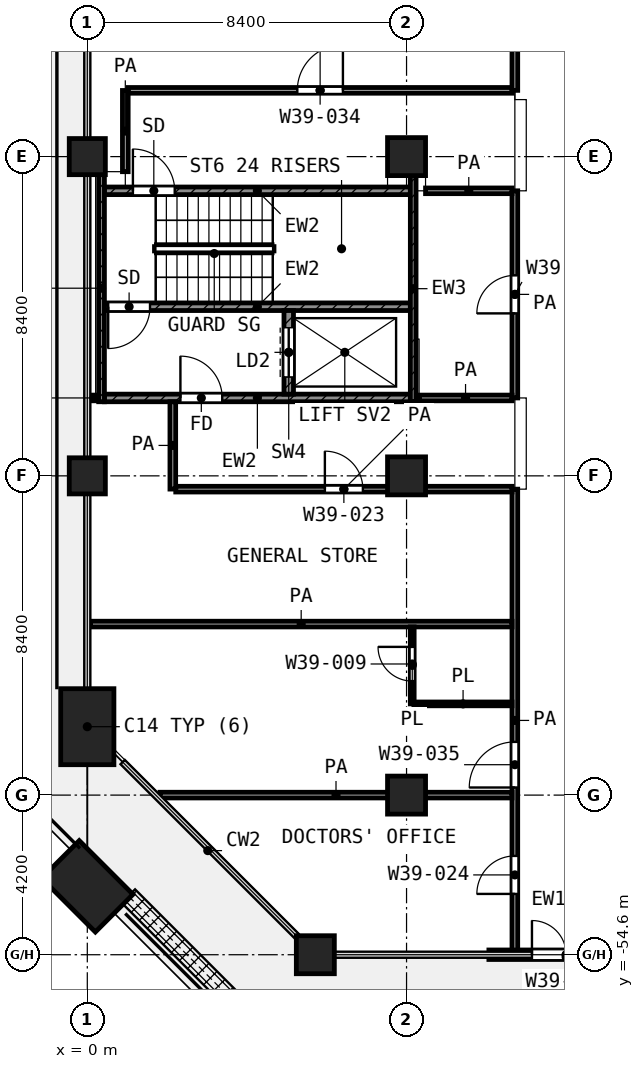
"""IFC4 building model, lengths in metres.
Left out: names, types, materials, properties, quantities, classifications, styles, units other than length and angle.
Written with IfcOpenShell. Run it as: python <this file> out.ifc"""

import sys

from ifc_helpers import new_model, si_unit, direction, frame, frame_2d, origin, origin_2d, place, context, subcontext, project, spatial, rectangle, extrude, element, fill, save


model = new_model("IFC4")
c1 = context("Model", 3, precision=1e-05, world=origin(), true_north=direction((0.0, 1.0)))
c2 = subcontext(c1, "Body", "Model", "MODEL_VIEW")
j1 = project(units=[si_unit("LENGTHUNIT", "METRE"), si_unit("PLANEANGLEUNIT", "RADIAN")], contexts=[c1])
p1 = place(None, origin())
s1 = spatial("IfcSite", under=j1, at=p1, CompositionType="ELEMENT")
p2 = place(p1, origin())
s2 = spatial("IfcBuilding", under=s1, at=p2, CompositionType="ELEMENT")
p3 = place(p2, frame((0.0, 0.0, 171.0)))
s3 = spatial("IfcBuildingStorey", under=s2, at=p3, CompositionType="ELEMENT", Elevation=171.0)
p4 = place(p3, frame((0.0, -33.6, 0.0), z_axis=(0.0, 0.0, 1.0), x_axis=(1.0, 0.0, 0.0)))
e1 = element("IfcColumn", 1, at=p4, inside=s3, PredefinedType="COLUMN", context=c2, shape_type="SweptSolid", body=[
    extrude(rectangle(XDim=0.95, YDim=0.95, at=origin_2d()), origin(), (0.0, 0.0, 1.0), 4.2),
])
p5 = place(p3, frame((8.4, -33.6, 0.0), z_axis=(0.0, 0.0, 1.0), x_axis=(1.0, 0.0, 0.0)))
e2 = element("IfcColumn", 2, at=p5, inside=s3, PredefinedType="COLUMN", context=c2, shape_type="SweptSolid", body=[
    extrude(rectangle(XDim=1.0, YDim=1.0, at=origin_2d()), origin(), (0.0, 0.0, 1.0), 4.2),
])
p6 = place(p3, frame((0.0, -42.0, 0.0), z_axis=(0.0, 0.0, 1.0), x_axis=(1.0, 0.0, 0.0)))
e3 = element("IfcColumn", 3, at=p6, inside=s3, PredefinedType="COLUMN", context=c2, shape_type="SweptSolid", body=[
    extrude(rectangle(XDim=0.95, YDim=0.95, at=origin_2d()), origin(), (0.0, 0.0, 1.0), 4.2),
])
p7 = place(p3, frame((8.4, -42.0, 0.0), z_axis=(0.0, 0.0, 1.0), x_axis=(1.0, 0.0, 0.0)))
e4 = element("IfcColumn", 4, at=p7, inside=s3, PredefinedType="COLUMN", context=c2, shape_type="SweptSolid", body=[
    extrude(rectangle(XDim=1.0, YDim=1.0, at=origin_2d()), origin(), (0.0, 0.0, 1.0), 4.2),
])
p8 = place(p3, frame((0.0, -48.6, 0.0), z_axis=(0.0, 0.0, 1.0), x_axis=(0.0, 1.0, 0.0)))
e5 = element("IfcColumn", 5, at=p8, inside=s3, PredefinedType="COLUMN", context=c2, shape_type="SweptSolid", body=[
    extrude(rectangle(XDim=2.0, YDim=1.4, at=origin_2d()), origin(), (0.0, 0.0, 1.0), 4.2),
])
for number, where, z_axis, x_axis in (
    (6, (8.4, -50.4, 0.0), (0.0, 0.0, 1.0), (1.0, 0.0, 0.0)),
    (7, (6.0, -54.6, 0.0), (0.0, 0.0, 1.0), (1.0, 0.0, 0.0)),
):
    element("IfcColumn", number, at=place(p3, frame(where, z_axis=z_axis, x_axis=x_axis)), inside=s3, PredefinedType="COLUMN", context=c2, shape_type="SweptSolid", body=[
        extrude(rectangle(XDim=1.0, YDim=1.0, at=origin_2d()), origin(), (0.0, 0.0, 1.0), 4.2),
    ])
p9 = place(p3, frame((0.0, -52.8, 0.0), z_axis=(0.0, 0.0, 1.0), x_axis=(-0.707106781187, 0.707106781187, 0.0)))
e8 = element("IfcColumn", 8, at=p9, inside=s3, PredefinedType="COLUMN", context=c2, shape_type="SweptSolid", body=[
    extrude(rectangle(XDim=2.0, YDim=1.4, at=origin_2d()), origin(), (0.0, 0.0, 1.0), 4.2),
])
p10 = place(p3, frame((10.567, -54.6, 0.0), z_axis=(0.0, 0.0, 1.0), x_axis=(1.0, 0.0, 0.0)))
e9 = element("IfcWall", 9, at=p10, inside=s3, PredefinedType="SOLIDWALL", context=c2, shape_type="SweptSolid", body=[
    extrude(rectangle(XDim=4.067, YDim=0.25, at=frame_2d((2.033, 0.0))), origin(), (0.0, 0.0, 1.0), 3.48),
])
p11 = place(p10, frame((1.133, 0.0, 0.0)))
e10 = element("IfcOpeningElement", 10, at=p11, cuts=e9, PredefinedType="OPENING", context=c2, shape_type="SweptSolid", body=[
    extrude(rectangle(XDim=1.8, YDim=2.1, at=frame_2d((0.9, 1.05))), frame((0.0, 0.135, 0.0), z_axis=(0.0, -1.0, 0.0), x_axis=(1.0, 0.0, 0.0)), (0.0, 0.0, 1.0), 0.27),
])
p12 = place(p3, frame((0.375, -40.05, 0.0), z_axis=(0.0, 0.0, 1.0), x_axis=(0.0, 1.0, 0.0)))
e11 = element("IfcWall", 11, at=p12, inside=s3, PredefinedType="SHEAR", context=c2, shape_type="SweptSolid", body=[
    extrude(rectangle(XDim=5.975, YDim=0.15, at=frame_2d((2.988, 0.0))), origin(), (0.0, 0.0, 1.0), 3.6),
])
p13 = place(p3, frame((8.575, -40.05, 0.0), z_axis=(0.0, 0.0, 1.0), x_axis=(0.0, 1.0, 0.0)))
e12 = element("IfcWall", 12, at=p13, inside=s3, PredefinedType="SHEAR", context=c2, shape_type="SweptSolid", body=[
    extrude(rectangle(XDim=5.95, YDim=0.15, at=frame_2d((2.975, 0.0))), origin(), (0.0, 0.0, 1.0), 3.6),
])
p14 = place(p3, frame((0.45, -34.5, 0.0), z_axis=(0.0, 0.0, 1.0), x_axis=(1.0, 0.0, 0.0)))
e13 = element("IfcWall", 13, at=p14, inside=s3, PredefinedType="SHEAR", context=c2, shape_type="SweptSolid", body=[
    extrude(rectangle(XDim=8.05, YDim=0.2, at=frame_2d((4.025, 0.0))), origin(), (0.0, 0.0, 1.0), 3.6),
])
p15 = place(p14, frame((0.75, 0.0, 0.0)))
e14 = element("IfcOpeningElement", 14, at=p15, cuts=e13, PredefinedType="OPENING", context=c2, shape_type="SweptSolid", body=[
    extrude(rectangle(XDim=1.1, YDim=2.1, at=frame_2d((0.55, 1.05))), frame((0.0, 0.11, 0.0), z_axis=(0.0, -1.0, 0.0), x_axis=(1.0, 0.0, 0.0)), (0.0, 0.0, 1.0), 0.22),
])
p16 = place(p3, frame((0.45, -37.55, 0.0), z_axis=(0.0, 0.0, 1.0), x_axis=(1.0, 0.0, 0.0)))
e15 = element("IfcWall", 15, at=p16, inside=s3, PredefinedType="SHEAR", context=c2, shape_type="SweptSolid", body=[
    extrude(rectangle(XDim=8.05, YDim=0.2, at=frame_2d((4.025, 0.0))), origin(), (0.0, 0.0, 1.0), 3.6),
])
p17 = place(p16, frame((0.1, 0.0, 0.0)))
e16 = element("IfcOpeningElement", 16, at=p17, cuts=e15, PredefinedType="OPENING", context=c2, shape_type="SweptSolid", body=[
    extrude(rectangle(XDim=1.1, YDim=2.1, at=frame_2d((0.55, 1.05))), frame((0.0, 0.11, 0.0), z_axis=(0.0, -1.0, 0.0), x_axis=(1.0, 0.0, 0.0)), (0.0, 0.0, 1.0), 0.22),
])
p18 = place(p3, frame((0.45, -39.95, 0.0), z_axis=(0.0, 0.0, 1.0), x_axis=(1.0, 0.0, 0.0)))
e17 = element("IfcWall", 17, at=p18, inside=s3, PredefinedType="SHEAR", context=c2, shape_type="SweptSolid", body=[
    extrude(rectangle(XDim=8.05, YDim=0.2, at=frame_2d((4.025, 0.0))), origin(), (0.0, 0.0, 1.0), 3.6),
])
p19 = place(p18, frame((2.0, 0.0, 0.0)))
e18 = element("IfcOpeningElement", 18, at=p19, cuts=e17, PredefinedType="OPENING", context=c2, shape_type="SweptSolid", body=[
    extrude(rectangle(XDim=1.1, YDim=2.1, at=frame_2d((0.55, 1.05))), frame((0.0, 0.11, 0.0), z_axis=(0.0, -1.0, 0.0), x_axis=(1.0, 0.0, 0.0)), (0.0, 0.0, 1.0), 0.22),
])
p20 = place(p3, frame((5.3, -39.85, 0.0), z_axis=(0.0, 0.0, 1.0), x_axis=(0.0, 1.0, 0.0)))
e19 = element("IfcWall", 19, at=p20, inside=s3, PredefinedType="SHEAR", context=c2, shape_type="SweptSolid", body=[
    extrude(rectangle(XDim=2.2, YDim=0.25, at=frame_2d((1.1, 0.0))), origin(), (0.0, 0.0, 1.0), 3.6),
])
p21 = place(p20, frame((0.45, 0.0, 0.0)))
e20 = element("IfcOpeningElement", 20, at=p21, cuts=e19, PredefinedType="OPENING", context=c2, shape_type="SweptSolid", body=[
    extrude(rectangle(XDim=1.3, YDim=2.1, at=frame_2d((0.65, 1.05))), frame((0.0, 0.135, 0.0), z_axis=(0.0, -1.0, 0.0), x_axis=(1.0, 0.0, 0.0)), (0.0, 0.0, 1.0), 0.27),
])
p22 = place(p3, frame((8.6, -48.0, 0.0), z_axis=(0.0, 0.0, 1.0), x_axis=(1.0, 0.0, 0.0)))
e21 = element("IfcWall", 21, at=p22, inside=s3, PredefinedType="PARTITIONING", context=c2, shape_type="SweptSolid", body=[
    extrude(rectangle(XDim=2.575, YDim=0.1, at=frame_2d((1.288, 0.0))), origin(), (0.0, 0.0, 1.0), 3.6),
])
p23 = place(p3, frame((8.55, -48.0, 0.0), z_axis=(0.0, 0.0, 1.0), x_axis=(0.0, 1.0, 0.0)))
e22 = element("IfcWall", 22, at=p23, inside=s3, PredefinedType="PARTITIONING", context=c2, shape_type="SweptSolid", body=[
    extrude(rectangle(XDim=2.025, YDim=0.1, at=frame_2d((1.012, 0.0))), origin(), (0.0, 0.0, 1.0), 3.6),
])
p24 = place(p23, frame((0.6, 0.0, 0.0)))
e23 = element("IfcOpeningElement", 23, at=p24, cuts=e22, PredefinedType="OPENING", context=c2, shape_type="SweptSolid", body=[
    extrude(rectangle(XDim=0.9, YDim=2.1, at=frame_2d((0.45, 1.05))), frame((0.0, 0.06, 0.0), z_axis=(0.0, -1.0, 0.0), x_axis=(1.0, 0.0, 0.0)), (0.0, 0.0, 1.0), 0.12),
])
p25 = place(p3, frame((1.913, -50.4, 0.0), z_axis=(0.0, 0.0, 1.0), x_axis=(1.0, 0.0, 0.0)))
e24 = element("IfcWall", 24, at=p25, inside=s3, PredefinedType="PARTITIONING", context=c2, shape_type="SweptSolid", body=[
    extrude(rectangle(XDim=9.262, YDim=0.15, at=frame_2d((4.631, 0.0))), origin(), (0.0, 0.0, 1.0), 3.6),
])
p26 = place(p3, frame((0.08, -45.9, 0.0), z_axis=(0.0, 0.0, 1.0), x_axis=(1.0, 0.0, 0.0)))
e25 = element("IfcWall", 25, at=p26, inside=s3, PredefinedType="PARTITIONING", context=c2, shape_type="SweptSolid", body=[
    extrude(rectangle(XDim=11.095, YDim=0.15, at=frame_2d((5.547, 0.0))), origin(), (0.0, 0.0, 1.0), 3.6),
])
p27 = place(p3, frame((2.327, -42.35, 0.0), z_axis=(0.0, 0.0, 1.0), x_axis=(1.0, 0.0, 0.0)))
e26 = element("IfcWall", 26, at=p27, inside=s3, PredefinedType="PARTITIONING", context=c2, shape_type="SweptSolid", body=[
    extrude(rectangle(XDim=8.848, YDim=0.15, at=frame_2d((4.424, 0.0))), origin(), (0.0, 0.0, 1.0), 3.6),
])
p28 = place(p27, frame((3.924, 0.0, 0.0)))
e27 = element("IfcOpeningElement", 27, at=p28, cuts=e26, PredefinedType="OPENING", context=c2, shape_type="SweptSolid", body=[
    extrude(rectangle(XDim=1.0, YDim=2.1, at=frame_2d((0.5, 1.05))), frame((0.0, 0.085, 0.0), z_axis=(0.0, -1.0, 0.0), x_axis=(1.0, 0.0, 0.0)), (0.0, 0.0, 1.0), 0.17),
])
p29 = place(p3, frame((0.08, -39.95, 0.0), z_axis=(0.0, 0.0, 1.0), x_axis=(1.0, 0.0, 0.0)))
e28 = element("IfcWall", 28, at=p29, inside=s3, PredefinedType="PARTITIONING", context=c2, shape_type="SweptSolid", body=[
    extrude(rectangle(XDim=0.19, YDim=0.15, at=frame_2d((0.095, 0.0))), origin(), (0.0, 0.0, 1.0), 3.6),
])
p30 = place(p3, frame((8.73, -39.95, 0.0), z_axis=(0.0, 0.0, 1.0), x_axis=(1.0, 0.0, 0.0)))
e29 = element("IfcWall", 29, at=p30, inside=s3, PredefinedType="PARTITIONING", context=c2, shape_type="SweptSolid", body=[
    extrude(rectangle(XDim=2.445, YDim=0.15, at=frame_2d((1.223, 0.0))), origin(), (0.0, 0.0, 1.0), 3.6),
])
p31 = place(p3, frame((8.9, -34.5, 0.0), z_axis=(0.0, 0.0, 1.0), x_axis=(1.0, 0.0, 0.0)))
e30 = element("IfcWall", 30, at=p31, inside=s3, PredefinedType="PARTITIONING", context=c2, shape_type="SweptSolid", body=[
    extrude(rectangle(XDim=2.275, YDim=0.15, at=frame_2d((1.138, 0.0))), origin(), (0.0, 0.0, 1.0), 3.6),
])
p32 = place(p3, frame((1.077, -31.857, 0.0), z_axis=(0.0, 0.0, 1.0), x_axis=(1.0, 0.0, 0.0)))
e31 = element("IfcWall", 31, at=p32, inside=s3, PredefinedType="PARTITIONING", context=c2, shape_type="SweptSolid", body=[
    extrude(rectangle(XDim=10.098, YDim=0.15, at=frame_2d((5.049, 0.0))), origin(), (0.0, 0.0, 1.0), 3.6),
])
p33 = place(p32, frame((4.449, 0.0, 0.0)))
e32 = element("IfcOpeningElement", 32, at=p33, cuts=e31, PredefinedType="OPENING", context=c2, shape_type="SweptSolid", body=[
    extrude(rectangle(XDim=1.2, YDim=2.1, at=frame_2d((0.6, 1.05))), frame((0.0, 0.085, 0.0), z_axis=(0.0, -1.0, 0.0), x_axis=(1.0, 0.0, 0.0)), (0.0, 0.0, 1.0), 0.17),
])
p34 = place(p3, frame((1.0, -33.997, 0.0), z_axis=(0.0, 0.0, 1.0), x_axis=(0.0, 1.0, 0.0)))
e33 = element("IfcWall", 33, at=p34, inside=s3, PredefinedType="PARTITIONING", context=c2, shape_type="SweptSolid", body=[
    extrude(rectangle(XDim=2.137, YDim=0.15, at=frame_2d((1.068, 0.0))), origin(), (0.0, 0.0, 1.0), 3.6),
])
p35 = place(p3, frame((2.25, -42.348, 0.0), z_axis=(0.0, 0.0, 1.0), x_axis=(0.0, 1.0, 0.0)))
e34 = element("IfcWall", 34, at=p35, inside=s3, PredefinedType="PARTITIONING", context=c2, shape_type="SweptSolid", body=[
    extrude(rectangle(XDim=2.298, YDim=0.15, at=frame_2d((1.149, 0.0))), origin(), (0.0, 0.0, 1.0), 3.6),
])
p36 = place(p3, frame((11.25, -54.52, 0.0), z_axis=(0.0, 0.0, 1.0), x_axis=(0.0, 1.0, 0.0)))
e35 = element("IfcWall", 35, at=p36, inside=s3, PredefinedType="PARTITIONING", context=c2, shape_type="SweptSolid", body=[
    extrude(rectangle(XDim=12.17, YDim=0.15, at=frame_2d((6.085, 0.0))), origin(), (0.0, 0.0, 1.0), 3.6),
])
p37 = place(p36, frame((4.32, 0.0, 0.0)))
e36 = element("IfcOpeningElement", 36, at=p37, cuts=e35, PredefinedType="OPENING", context=c2, shape_type="SweptSolid", body=[
    extrude(rectangle(XDim=1.2, YDim=2.1, at=frame_2d((0.6, 1.05))), frame((0.0, 0.085, 0.0), z_axis=(0.0, -1.0, 0.0), x_axis=(1.0, 0.0, 0.0)), (0.0, 0.0, 1.0), 0.17),
])
p38 = place(p36, frame((1.52, 0.0, 0.0)))
e37 = element("IfcOpeningElement", 37, at=p38, cuts=e35, PredefinedType="OPENING", context=c2, shape_type="SweptSolid", body=[
    extrude(rectangle(XDim=1.0, YDim=2.1, at=frame_2d((0.5, 1.05))), frame((0.0, 0.085, 0.0), z_axis=(0.0, -1.0, 0.0), x_axis=(1.0, 0.0, 0.0)), (0.0, 0.0, 1.0), 0.17),
])
p39 = place(p3, frame((11.25, -39.95, 0.0), z_axis=(0.0, 0.0, 1.0), x_axis=(0.0, 1.0, 0.0)))
e38 = element("IfcWall", 38, at=p39, inside=s3, PredefinedType="PARTITIONING", context=c2, shape_type="SweptSolid", body=[
    extrude(rectangle(XDim=5.45, YDim=0.15, at=frame_2d((2.725, 0.0))), origin(), (0.0, 0.0, 1.0), 3.6),
])
p40 = place(p39, frame((2.225, 0.0, 0.0)))
e39 = element("IfcOpeningElement", 39, at=p40, cuts=e38, PredefinedType="OPENING", context=c2, shape_type="SweptSolid", body=[
    extrude(rectangle(XDim=1.0, YDim=2.1, at=frame_2d((0.5, 1.05))), frame((0.0, 0.085, 0.0), z_axis=(0.0, -1.0, 0.0), x_axis=(1.0, 0.0, 0.0)), (0.0, 0.0, 1.0), 0.17),
])
p41 = place(p3, frame((11.25, -31.857, 0.0), z_axis=(0.0, 0.0, 1.0), x_axis=(0.0, 1.0, 0.0)))
e40 = element("IfcWall", 40, at=p41, inside=s3, PredefinedType="PARTITIONING", context=c2, shape_type="SweptSolid", body=[
    extrude(rectangle(XDim=2.457, YDim=0.15, at=frame_2d((1.229, 0.0))), origin(), (0.0, 0.0, 1.0), 3.6),
])
p42 = place(p11, origin())
e41 = element("IfcDoor", 41, at=p42, inside=s3, OperationType="DOUBLE_DOOR_SINGLE_SWING", PredefinedType="DOOR", context=c2, shape_type="SweptSolid", body=[
    extrude(rectangle(XDim=1.8, YDim=2.1, at=frame_2d((0.9, 1.05))), frame((0.0, 0.025, 0.0), z_axis=(0.0, -1.0, 0.0), x_axis=(1.0, 0.0, 0.0)), (0.0, 0.0, 1.0), 0.05),
])
fill(e10, e41)
p43 = place(p15, origin())
e42 = element("IfcDoor", 42, at=p43, inside=s3, OperationType="SINGLE_SWING_LEFT", PredefinedType="DOOR", context=c2, shape_type="SweptSolid", body=[
    extrude(rectangle(XDim=1.1, YDim=2.1, at=frame_2d((0.55, 1.05))), frame((0.0, 0.025, 0.0), z_axis=(0.0, -1.0, 0.0), x_axis=(1.0, 0.0, 0.0)), (0.0, 0.0, 1.0), 0.05),
])
fill(e14, e42)
p44 = place(p17, frame((1.1, 0.0, 0.0), z_axis=(0.0, 0.0, 1.0), x_axis=(-1.0, 0.0, 0.0)))
e43 = element("IfcDoor", 43, at=p44, inside=s3, OperationType="SINGLE_SWING_LEFT", PredefinedType="DOOR", context=c2, shape_type="SweptSolid", body=[
    extrude(rectangle(XDim=1.1, YDim=2.1, at=frame_2d((0.55, 1.05))), frame((0.0, 0.025, 0.0), z_axis=(0.0, -1.0, 0.0), x_axis=(1.0, 0.0, 0.0)), (0.0, 0.0, 1.0), 0.05),
])
fill(e16, e43)
p45 = place(p21, origin())
e44 = element("IfcDoor", 44, at=p45, inside=s3, OperationType="DOUBLE_DOOR_SLIDING", PredefinedType="DOOR", context=c2, shape_type="SweptSolid", body=[
    extrude(rectangle(XDim=1.3, YDim=2.1, at=frame_2d((0.65, 1.05))), frame((0.0, 0.025, 0.0), z_axis=(0.0, -1.0, 0.0), x_axis=(1.0, 0.0, 0.0)), (0.0, 0.0, 1.0), 0.05),
])
fill(e20, e44)
p46 = place(p19, origin())
e45 = element("IfcDoor", 45, at=p46, inside=s3, OperationType="SINGLE_SWING_LEFT", PredefinedType="DOOR", context=c2, shape_type="SweptSolid", body=[
    extrude(rectangle(XDim=1.1, YDim=2.1, at=frame_2d((0.55, 1.05))), frame((0.0, 0.025, 0.0), z_axis=(0.0, -1.0, 0.0), x_axis=(1.0, 0.0, 0.0)), (0.0, 0.0, 1.0), 0.05),
])
fill(e18, e45)
p47 = place(p33, origin())
e46 = element("IfcDoor", 46, at=p47, inside=s3, OperationType="SINGLE_SWING_RIGHT", PredefinedType="DOOR", context=c2, shape_type="SweptSolid", body=[
    extrude(rectangle(XDim=1.2, YDim=2.1, at=frame_2d((0.6, 1.05))), frame((0.0, 0.025, 0.0), z_axis=(0.0, -1.0, 0.0), x_axis=(1.0, 0.0, 0.0)), (0.0, 0.0, 1.0), 0.05),
])
fill(e32, e46)
p48 = place(p40, origin())
e47 = element("IfcDoor", 47, at=p48, inside=s3, OperationType="SINGLE_SWING_LEFT", PredefinedType="DOOR", context=c2, shape_type="SweptSolid", body=[
    extrude(rectangle(XDim=1.0, YDim=2.1, at=frame_2d((0.5, 1.05))), frame((0.0, 0.025, 0.0), z_axis=(0.0, -1.0, 0.0), x_axis=(1.0, 0.0, 0.0)), (0.0, 0.0, 1.0), 0.05),
])
fill(e39, e47)
p49 = place(p28, origin())
e48 = element("IfcDoor", 48, at=p49, inside=s3, OperationType="SINGLE_SWING_LEFT", PredefinedType="DOOR", context=c2, shape_type="SweptSolid", body=[
    extrude(rectangle(XDim=1.0, YDim=2.1, at=frame_2d((0.5, 1.05))), frame((0.0, 0.025, 0.0), z_axis=(0.0, -1.0, 0.0), x_axis=(1.0, 0.0, 0.0)), (0.0, 0.0, 1.0), 0.05),
])
fill(e27, e48)
p50 = place(p37, origin())
e49 = element("IfcDoor", 49, at=p50, inside=s3, OperationType="SINGLE_SWING_LEFT", PredefinedType="DOOR", context=c2, shape_type="SweptSolid", body=[
    extrude(rectangle(XDim=1.2, YDim=2.1, at=frame_2d((0.6, 1.05))), frame((0.0, 0.025, 0.0), z_axis=(0.0, -1.0, 0.0), x_axis=(1.0, 0.0, 0.0)), (0.0, 0.0, 1.0), 0.05),
])
fill(e36, e49)
p51 = place(p24, origin())
e50 = element("IfcDoor", 50, at=p51, inside=s3, OperationType="SINGLE_SWING_RIGHT", PredefinedType="DOOR", context=c2, shape_type="SweptSolid", body=[
    extrude(rectangle(XDim=0.9, YDim=2.1, at=frame_2d((0.45, 1.05))), frame((0.0, 0.025, 0.0), z_axis=(0.0, -1.0, 0.0), x_axis=(1.0, 0.0, 0.0)), (0.0, 0.0, 1.0), 0.05),
])
fill(e23, e50)
p52 = place(p38, origin())
e51 = element("IfcDoor", 51, at=p52, inside=s3, OperationType="SINGLE_SWING_LEFT", PredefinedType="DOOR", context=c2, shape_type="SweptSolid", body=[
    extrude(rectangle(XDim=1.0, YDim=2.1, at=frame_2d((0.5, 1.05))), frame((0.0, 0.025, 0.0), z_axis=(0.0, -1.0, 0.0), x_axis=(1.0, 0.0, 0.0)), (0.0, 0.0, 1.0), 0.05),
])
fill(e37, e51)
save(model, sys.argv[1])
